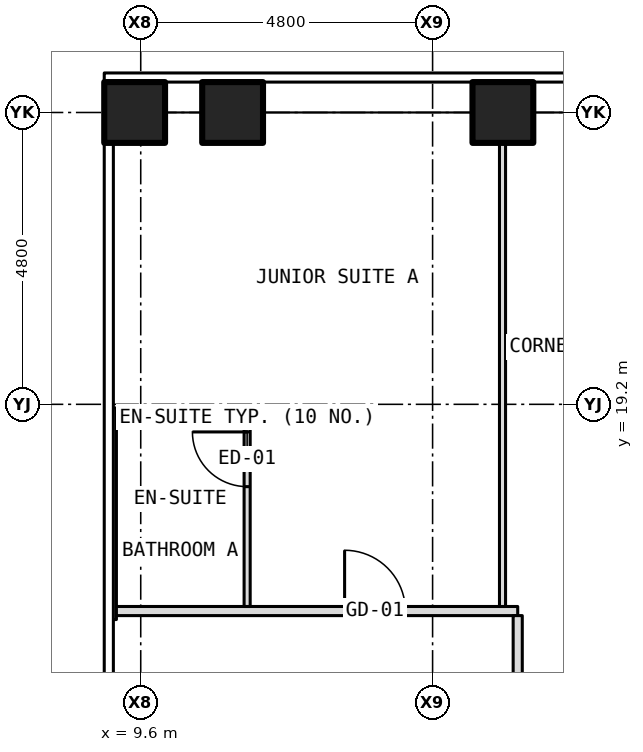
"""IFC4 building model, lengths in metres.
Left out: names, types, materials, properties, quantities, classifications, styles, units other than length and angle.
Written with IfcOpenShell. Run it as: python <this file> out.ifc"""

import sys

from ifc_helpers import new_model, si_unit, direction, frame, frame_2d, origin, origin_2d, place, context, subcontext, project, spatial, rectangle, hollow_rectangle, extrude, element, fill, save


model = new_model("IFC4")
c1 = context("Model", 3, precision=1e-05, world=origin(), true_north=direction((0.0, 1.0)))
c2 = subcontext(c1, "Body", "Model", "MODEL_VIEW")
j1 = project(units=[si_unit("LENGTHUNIT", "METRE"), si_unit("PLANEANGLEUNIT", "RADIAN")], contexts=[c1])
p1 = place(None, origin())
s1 = spatial("IfcSite", under=j1, at=p1, CompositionType="ELEMENT")
p2 = place(p1, origin())
s2 = spatial("IfcBuilding", under=s1, at=p2, CompositionType="ELEMENT")
p3 = place(p2, frame((0.0, 0.0, 74.0)))
s3 = spatial("IfcBuildingStorey", under=s2, at=p3, CompositionType="ELEMENT", Elevation=74.0)
for number, where, z_axis, x_axis in (
    (1, (11.111, 24.0, -0.15), (0.0, 0.0, 1.0), (1.0, 0.0, 0.0)),
    (2, (15.556, 24.0, -0.15), (0.0, 0.0, 1.0), (1.0, 0.0, 0.0)),
    (3, (9.5, 24.0, -0.15), (0.0, 0.0, 1.0), (1.0, 0.0, 0.0)),
):
    element("IfcColumn", number, at=place(p3, frame(where, z_axis=z_axis, x_axis=x_axis)), inside=s3, PredefinedType="COLUMN", context=c2, shape_type="SweptSolid", body=[
        extrude(hollow_rectangle(XDim=1.0, YDim=1.0, WallThickness=0.06, at=origin_2d()), origin(), (0.0, 0.0, 1.0), 3.5),
    ])
p4 = place(p3, frame((9.15, 15.8, 0.0), z_axis=(0.0, 0.0, 1.0), x_axis=(1.0, 0.0, 0.0)))
e4 = element("IfcWall", 4, at=p4, inside=s3, PredefinedType="PARTITIONING", context=c2, shape_type="SweptSolid", body=[
    extrude(rectangle(XDim=6.65, YDim=0.15, at=frame_2d((3.325, 0.0))), origin(), (0.0, 0.0, 1.0), 3.35),
])
p5 = place(p4, frame((3.803, 0.0, 0.0)))
e5 = element("IfcOpeningElement", 5, at=p5, cuts=e4, PredefinedType="OPENING", context=c2, shape_type="SweptSolid", body=[
    extrude(rectangle(XDim=1.0, YDim=2.1, at=frame_2d((0.5, 1.05))), frame((0.0, 0.087, 0.0), z_axis=(0.0, -1.0, 0.0), x_axis=(1.0, 0.0, 0.0)), (0.0, 0.0, 1.0), 0.174),
])
p6 = place(p3, frame((9.15, 19.0, 0.0), z_axis=(0.0, 0.0, 1.0), x_axis=(1.0, 0.0, 0.0)))
e6 = element("IfcWall", 6, at=p6, inside=s3, PredefinedType="PARTITIONING", context=c2, shape_type="SweptSolid", body=[
    extrude(rectangle(XDim=2.2, YDim=0.1, at=frame_2d((1.1, 0.0))), origin(), (0.0, 0.0, 1.0), 3.35),
])
p7 = place(p3, frame((9.15, 15.66, 0.0), z_axis=(0.0, 0.0, 1.0), x_axis=(0.0, 1.0, 0.0)))
e7 = element("IfcWall", 7, at=p7, inside=s3, PredefinedType="PARTITIONING", context=c2, shape_type="SweptSolid", body=[
    extrude(rectangle(XDim=3.48, YDim=0.1, at=frame_2d((1.74, 0.0))), origin(), (0.0, 0.0, 1.0), 2.733),
])
p8 = place(p3, frame((11.35, 15.875, 0.0), z_axis=(0.0, 0.0, 1.0), x_axis=(0.0, 1.0, 0.0)))
e8 = element("IfcWall", 8, at=p8, inside=s3, PredefinedType="PARTITIONING", context=c2, shape_type="SweptSolid", body=[
    extrude(rectangle(XDim=3.075, YDim=0.1, at=frame_2d((1.538, 0.0))), origin(), (0.0, 0.0, 1.0), 3.35),
])
p9 = place(p8, frame((1.971, 0.0, 0.0)))
e9 = element("IfcOpeningElement", 9, at=p9, cuts=e8, PredefinedType="OPENING", context=c2, shape_type="SweptSolid", body=[
    extrude(rectangle(XDim=0.9, YDim=2.1, at=frame_2d((0.45, 1.05))), frame((0.0, 0.062, 0.0), z_axis=(0.0, -1.0, 0.0), x_axis=(1.0, 0.0, 0.0)), (0.0, 0.0, 1.0), 0.124),
])
p10 = place(p3, frame((15.55, 15.875, 0.0), z_axis=(0.0, 0.0, 1.0), x_axis=(0.0, 1.0, 0.0)))
e10 = element("IfcWall", 10, at=p10, inside=s3, PredefinedType="PARTITIONING", context=c2, shape_type="SweptSolid", body=[
    extrude(rectangle(XDim=8.005, YDim=0.1, at=frame_2d((4.002, 0.0))), origin(), (0.0, 0.0, 1.0), 3.35),
])
p11 = place(p3, frame((15.8, 10.92, 0.0), z_axis=(0.0, 0.0, 1.0), x_axis=(0.0, 1.0, 0.0)))
e11 = element("IfcWall", 11, at=p11, inside=s3, PredefinedType="PARTITIONING", context=c2, shape_type="SweptSolid", body=[
    extrude(rectangle(XDim=4.805, YDim=0.15, at=frame_2d((2.403, 0.0))), origin(), (0.0, 0.0, 1.0), 3.35),
])
p12 = place(p11, frame((0.78, 0.0, 0.0)))
e12 = element("IfcOpeningElement", 12, at=p12, cuts=e11, PredefinedType="OPENING", context=c2, shape_type="SweptSolid", body=[
    extrude(rectangle(XDim=1.0, YDim=2.1, at=frame_2d((0.5, 1.05))), frame((0.0, 0.087, 0.0), z_axis=(0.0, -1.0, 0.0), x_axis=(1.0, 0.0, 0.0)), (0.0, 0.0, 1.0), 0.174),
])
p13 = place(p5, origin())
e13 = element("IfcDoor", 13, at=p13, inside=s3, OperationType="SINGLE_SWING_LEFT", PredefinedType="DOOR", context=c2, shape_type="SweptSolid", body=[
    extrude(rectangle(XDim=1.0, YDim=2.1, at=frame_2d((0.5, 1.05))), frame((0.0, 0.025, 0.0), z_axis=(0.0, -1.0, 0.0), x_axis=(1.0, 0.0, 0.0)), (0.0, 0.0, 1.0), 0.05),
])
fill(e5, e13)
p14 = place(p9, origin())
e14 = element("IfcDoor", 14, at=p14, inside=s3, OperationType="SINGLE_SWING_RIGHT", PredefinedType="DOOR", context=c2, shape_type="SweptSolid", body=[
    extrude(rectangle(XDim=0.9, YDim=2.1, at=frame_2d((0.45, 1.05))), frame((0.0, 0.025, 0.0), z_axis=(0.0, -1.0, 0.0), x_axis=(1.0, 0.0, 0.0)), (0.0, 0.0, 1.0), 0.05),
])
fill(e9, e14)
save(model, sys.argv[1])
